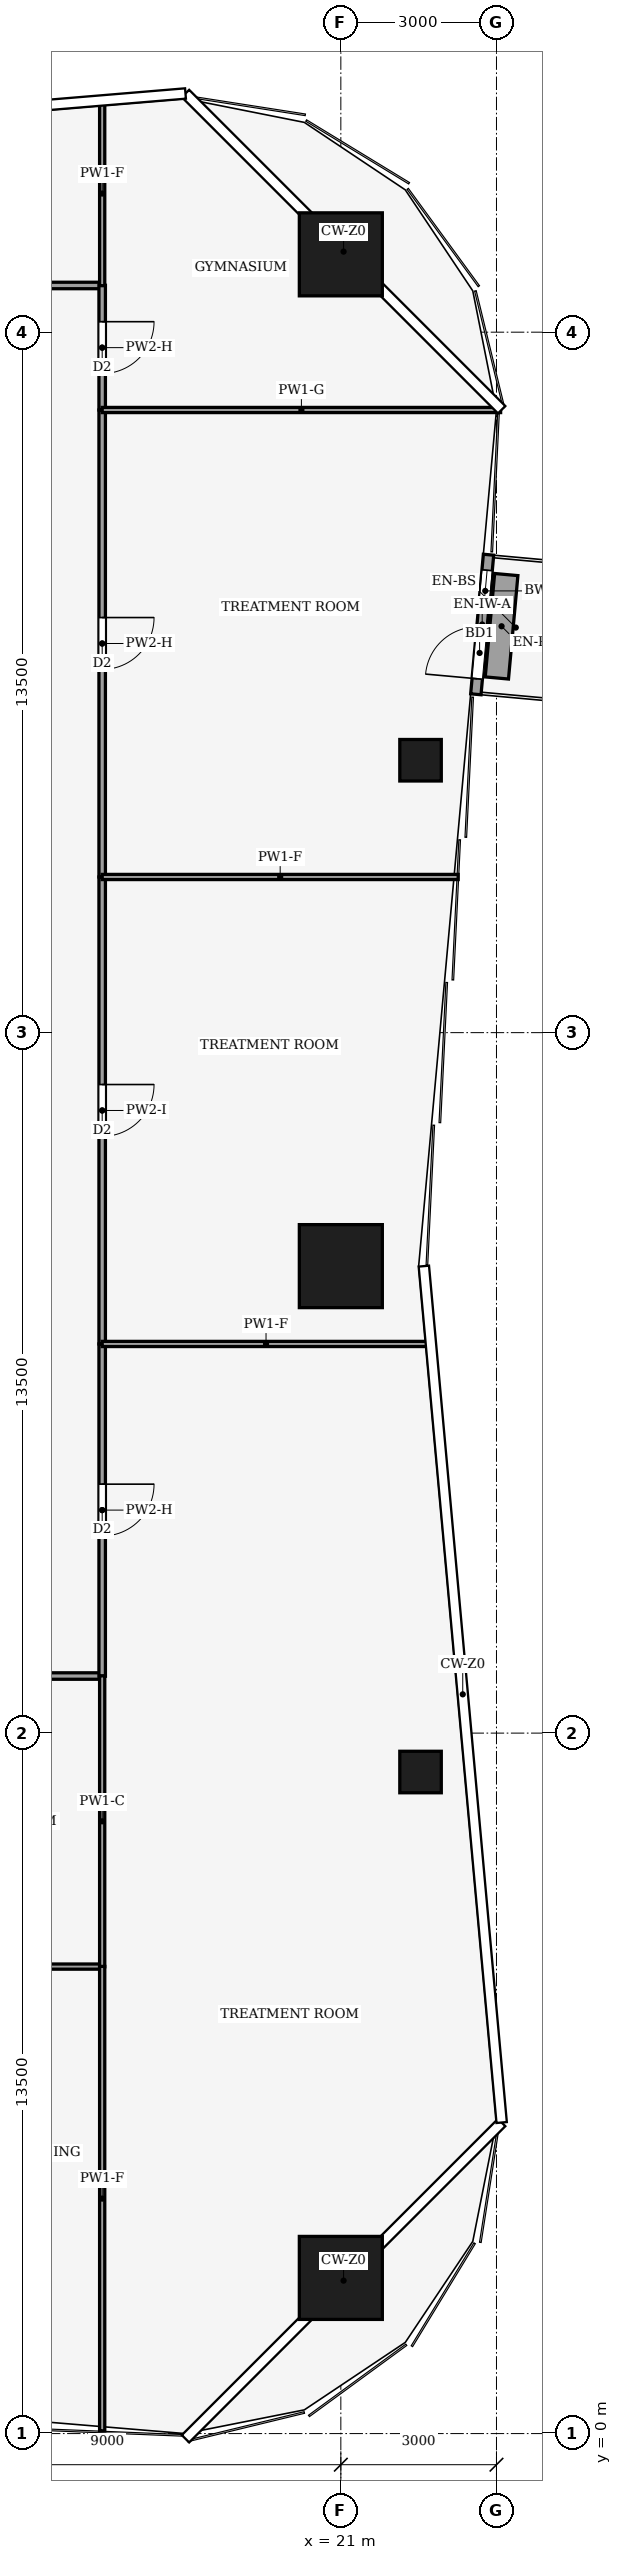
"""IFC4 building model, lengths in metres.
Left out: names, types, materials, properties, quantities, classifications, styles, units other than length and angle.
Written with IfcOpenShell. Run it as: python <this file> out.ifc"""

import sys

from ifc_helpers import new_model, si_unit, direction, frame, frame_2d, origin, origin_2d, place, context, subcontext, project, spatial, rectangle, hollow_rectangle, extrude, element, fill, save


model = new_model("IFC4")
c1 = context("Model", 3, precision=1e-05, world=origin(), true_north=direction((0.0, 1.0)))
c2 = subcontext(c1, "Body", "Model", "MODEL_VIEW")
j1 = project(units=[si_unit("LENGTHUNIT", "METRE"), si_unit("PLANEANGLEUNIT", "RADIAN")], contexts=[c1])
p1 = place(None, origin())
s1 = spatial("IfcSite", under=j1, at=p1, CompositionType="ELEMENT")
p2 = place(p1, origin())
s2 = spatial("IfcBuilding", under=s1, at=p2, CompositionType="ELEMENT")
p3 = place(p2, frame((0.0, 0.0, 18.0)))
s3 = spatial("IfcBuildingStorey", under=s2, at=p3, CompositionType="ELEMENT", Elevation=18.0)
for number, where, z_axis, x_axis in (
    (1, (21.0, 42.0, 0.0), (0.0, 0.0, 1.0), (1.0, 0.0, 0.0)),
    (2, (21.0, 22.5, 0.0), (0.0, 0.0, 1.0), (1.0, 0.0, 0.0)),
    (3, (21.0, 3.0, 0.0), (0.0, 0.0, 1.0), (1.0, 0.0, 0.0)),
):
    element("IfcColumn", number, at=place(p3, frame(where, z_axis=z_axis, x_axis=x_axis)), inside=s3, PredefinedType="COLUMN", context=c2, shape_type="SweptSolid", body=[
        extrude(hollow_rectangle(XDim=1.6, YDim=1.6, WallThickness=0.09, at=origin_2d()), origin(), (0.0, 0.0, 1.0), 4.0),
    ])
for number, where, z_axis, x_axis in (
    (4, (22.536, 12.75, 0.0), (0.0, 0.0, 1.0), (1.0, 0.0, 0.0)),
    (5, (22.536, 32.25, 0.0), (0.0, 0.0, 1.0), (1.0, 0.0, 0.0)),
):
    element("IfcColumn", number, at=place(p3, frame(where, z_axis=z_axis, x_axis=x_axis)), inside=s3, PredefinedType="COLUMN", context=c2, shape_type="SweptSolid", body=[
        extrude(hollow_rectangle(XDim=0.8, YDim=0.8, WallThickness=0.04, at=origin_2d()), origin(), (0.0, 0.0, 1.0), 4.0),
    ])
p4 = place(p3, frame((23.602, 33.521, 0.0), z_axis=(0.0, 0.0, 1.0), x_axis=(0.090552042494, 0.995891724838, 0.0)))
e6 = element("IfcWall", 6, at=p4, inside=s3, PredefinedType="SOLIDWALL", context=c2, shape_type="SweptSolid", body=[
    extrude(rectangle(XDim=2.701, YDim=0.2, at=frame_2d((1.351, 0.0))), origin(), (0.0, 0.0, 1.0), 3.65),
])
p5 = place(p4, frame((0.3, 0.0, 0.0)))
e7 = element("IfcOpeningElement", 7, at=p5, cuts=e6, PredefinedType="OPENING", context=c2, shape_type="SweptSolid", body=[
    extrude(rectangle(XDim=1.0, YDim=2.1, at=frame_2d((0.5, 1.05))), frame((0.0, 0.11, 0.0), z_axis=(0.0, -1.0, 0.0), x_axis=(1.0, 0.0, 0.0)), (0.0, 0.0, 1.0), 0.22),
])
p6 = place(p4, frame((1.601, 0.0, 0.9)))
e8 = element("IfcOpeningElement", 8, at=p6, cuts=e6, PredefinedType="OPENING", context=c2, shape_type="SweptSolid", body=[
    extrude(rectangle(XDim=0.8, YDim=1.2, at=frame_2d((0.4, 0.6))), frame((0.0, 0.11, 0.0), z_axis=(0.0, -1.0, 0.0), x_axis=(1.0, 0.0, 0.0)), (0.0, 0.0, 1.0), 0.22),
])
p7 = place(p3, frame((24.008, 33.835, 0.0), z_axis=(0.0, 0.0, 1.0), x_axis=(0.090513748512, 0.995895205998, 0.0)))
e9 = element("IfcWall", 9, at=p7, inside=s3, PredefinedType="USERDEFINED", context=c2, shape_type="SweptSolid", body=[
    extrude(rectangle(XDim=2.001, YDim=0.45, at=frame_2d((1.001, 0.0))), origin(), (0.0, 0.0, 1.0), 0.4),
])
p8 = place(p3, frame((16.4, 14.6, 0.0), z_axis=(0.0, 0.0, 1.0), x_axis=(-1.0, 0.0, 0.0)))
e10 = element("IfcWall", 10, at=p8, inside=s3, PredefinedType="PARTITIONING", context=c2, shape_type="SweptSolid", body=[
    extrude(rectangle(XDim=4.4, YDim=0.125, at=frame_2d((2.2, 0.0))), origin(), (0.0, 0.0, 1.0), 3.29),
])
p9 = place(p8, frame((1.7, 0.0, 0.0)))
e11 = element("IfcOpeningElement", 11, at=p9, cuts=e10, PredefinedType="OPENING", context=c2, shape_type="SweptSolid", body=[
    extrude(rectangle(XDim=1.0, YDim=2.1, at=frame_2d((0.5, 1.05))), frame((0.0, 0.073, 0.0), z_axis=(0.0, -1.0, 0.0), x_axis=(1.0, 0.0, 0.0)), (0.0, 0.0, 1.0), 0.145),
])
p10 = place(p3, frame((6.0, 41.4, 0.0), z_axis=(0.0, 0.0, 1.0), x_axis=(1.0, 0.0, 0.0)))
e12 = element("IfcWall", 12, at=p10, inside=s3, PredefinedType="PARTITIONING", context=c2, shape_type="SweptSolid", body=[
    extrude(rectangle(XDim=10.4, YDim=0.125, at=frame_2d((5.2, 0.0))), origin(), (0.0, 0.0, 1.0), 3.54),
])
p11 = place(p10, frame((1.9, 0.0, 0.0)))
e13 = element("IfcOpeningElement", 13, at=p11, cuts=e12, PredefinedType="OPENING", context=c2, shape_type="SweptSolid", body=[
    extrude(rectangle(XDim=1.0, YDim=2.1, at=frame_2d((0.5, 1.05))), frame((0.0, 0.073, 0.0), z_axis=(0.0, -1.0, 0.0), x_axis=(1.0, 0.0, 0.0)), (0.0, 0.0, 1.0), 0.145),
])
p12 = place(p3, frame((16.4, 21.0, 0.0), z_axis=(0.0, 0.0, 1.0), x_axis=(0.0, -1.0, 0.0)))
e14 = element("IfcWall", 14, at=p12, inside=s3, PredefinedType="PARTITIONING", context=c2, shape_type="SweptSolid", body=[
    extrude(rectangle(XDim=6.404, YDim=0.125, at=frame_2d((3.202, 0.0))), origin(), (0.0, 0.0, 1.0), 3.14),
])
p13 = place(p12, frame((2.702, 0.0, 0.0)))
e15 = element("IfcOpeningElement", 15, at=p13, cuts=e14, PredefinedType="OPENING", context=c2, shape_type="SweptSolid", body=[
    extrude(rectangle(XDim=1.0, YDim=2.1, at=frame_2d((0.5, 1.05))), frame((0.0, 0.073, 0.0), z_axis=(0.0, -1.0, 0.0), x_axis=(1.0, 0.0, 0.0)), (0.0, 0.0, 1.0), 0.145),
])
p14 = place(p3, frame((16.4, 30.0, 0.0), z_axis=(0.0, 0.0, 1.0), x_axis=(0.0, -1.0, 0.0)))
e16 = element("IfcWall", 16, at=p14, inside=s3, PredefinedType="PARTITIONING", context=c2, shape_type="SweptSolid", body=[
    extrude(rectangle(XDim=9.0, YDim=0.125, at=frame_2d((4.5, 0.0))), origin(), (0.0, 0.0, 1.0), 3.48),
])
p15 = place(p14, frame((4.0, 0.0, 0.0)))
e17 = element("IfcOpeningElement", 17, at=p15, cuts=e16, PredefinedType="OPENING", context=c2, shape_type="SweptSolid", body=[
    extrude(rectangle(XDim=1.0, YDim=2.1, at=frame_2d((0.5, 1.05))), frame((0.0, 0.073, 0.0), z_axis=(0.0, -1.0, 0.0), x_axis=(1.0, 0.0, 0.0)), (0.0, 0.0, 1.0), 0.145),
])
p16 = place(p3, frame((16.4, 39.0, 0.0), z_axis=(0.0, 0.0, 1.0), x_axis=(0.0, -1.0, 0.0)))
e18 = element("IfcWall", 18, at=p16, inside=s3, PredefinedType="PARTITIONING", context=c2, shape_type="SweptSolid", body=[
    extrude(rectangle(XDim=9.0, YDim=0.125, at=frame_2d((4.5, 0.0))), origin(), (0.0, 0.0, 1.0), 3.14),
])
p17 = place(p16, frame((4.0, 0.0, 0.0)))
e19 = element("IfcOpeningElement", 19, at=p17, cuts=e18, PredefinedType="OPENING", context=c2, shape_type="SweptSolid", body=[
    extrude(rectangle(XDim=1.0, YDim=2.1, at=frame_2d((0.5, 1.05))), frame((0.0, 0.073, 0.0), z_axis=(0.0, -1.0, 0.0), x_axis=(1.0, 0.0, 0.0)), (0.0, 0.0, 1.0), 0.145),
])
p18 = place(p3, frame((16.4, 41.404, 0.0), z_axis=(0.0, 0.0, 1.0), x_axis=(0.0, -1.0, 0.0)))
e20 = element("IfcWall", 20, at=p18, inside=s3, PredefinedType="PARTITIONING", context=c2, shape_type="SweptSolid", body=[
    extrude(rectangle(XDim=2.404, YDim=0.125, at=frame_2d((1.202, 0.0))), origin(), (0.0, 0.0, 1.0), 3.14),
])
p19 = place(p18, frame((0.702, 0.0, 0.0)))
e21 = element("IfcOpeningElement", 21, at=p19, cuts=e20, PredefinedType="OPENING", context=c2, shape_type="SweptSolid", body=[
    extrude(rectangle(XDim=1.0, YDim=2.1, at=frame_2d((0.5, 1.05))), frame((0.0, 0.073, 0.0), z_axis=(0.0, -1.0, 0.0), x_axis=(1.0, 0.0, 0.0)), (0.0, 0.0, 1.0), 0.145),
])
p20 = place(p3, frame((12.0, 9.0, 0.0), z_axis=(0.0, 0.0, 1.0), x_axis=(1.0, 0.0, 0.0)))
e22 = element("IfcWall", 22, at=p20, inside=s3, PredefinedType="PARTITIONING", context=c2, shape_type="SweptSolid", body=[
    extrude(rectangle(XDim=4.4, YDim=0.1, at=frame_2d((2.2, 0.0))), origin(), (0.0, 0.0, 1.0), 3.29),
])
p21 = place(p3, frame((16.4, 8.996, 0.0), z_axis=(0.0, 0.0, 1.0), x_axis=(0.0, 1.0, 0.0)))
e23 = element("IfcWall", 23, at=p21, inside=s3, PredefinedType="PARTITIONING", context=c2, shape_type="SweptSolid", body=[
    extrude(rectangle(XDim=5.608, YDim=0.1, at=frame_2d((2.804, 0.0))), origin(), (0.0, 0.0, 1.0), 3.87),
])
p22 = place(p3, frame((16.4, 0.053, 0.0), z_axis=(0.0, 0.0, 1.0), x_axis=(0.0, 1.0, 0.0)))
e24 = element("IfcWall", 24, at=p22, inside=s3, PredefinedType="PARTITIONING", context=c2, shape_type="SweptSolid", body=[
    extrude(rectangle(XDim=8.951, YDim=0.1, at=frame_2d((4.475, 0.0))), origin(), (0.0, 0.0, 1.0), 3.04),
])
p23 = place(p3, frame((16.4, 41.396, 0.0), z_axis=(0.0, 0.0, 1.0), x_axis=(0.0, 1.0, 0.0)))
e25 = element("IfcWall", 25, at=p23, inside=s3, PredefinedType="PARTITIONING", context=c2, shape_type="SweptSolid", body=[
    extrude(rectangle(XDim=3.551, YDim=0.1, at=frame_2d((1.775, 0.0))), origin(), (0.0, 0.0, 1.0), 3.04),
])
p24 = place(p3, frame((22.716, 21.0, 0.0), z_axis=(0.0, 0.0, 1.0), x_axis=(-1.0, 0.0, 0.0)))
e26 = element("IfcWall", 26, at=p24, inside=s3, PredefinedType="PARTITIONING", context=c2, shape_type="SweptSolid", body=[
    extrude(rectangle(XDim=6.316, YDim=0.1, at=frame_2d((3.158, 0.0))), origin(), (0.0, 0.0, 1.0), 3.04),
])
p25 = place(p3, frame((23.262, 30.0, 0.0), z_axis=(0.0, 0.0, 1.0), x_axis=(-1.0, 0.0, 0.0)))
e27 = element("IfcWall", 27, at=p25, inside=s3, PredefinedType="PARTITIONING", context=c2, shape_type="SweptSolid", body=[
    extrude(rectangle(XDim=6.862, YDim=0.1, at=frame_2d((3.431, 0.0))), origin(), (0.0, 0.0, 1.0), 3.04),
])
p26 = place(p3, frame((24.08, 39.0, 0.0), z_axis=(0.0, 0.0, 1.0), x_axis=(-1.0, 0.0, 0.0)))
e28 = element("IfcWall", 28, at=p26, inside=s3, PredefinedType="PARTITIONING", context=c2, shape_type="SweptSolid", body=[
    extrude(rectangle(XDim=7.68, YDim=0.1, at=frame_2d((3.84, 0.0))), origin(), (0.0, 0.0, 1.0), 2.93),
])
p27 = place(p5, origin())
e29 = element("IfcDoor", 29, at=p27, inside=s3, OperationType="SINGLE_SWING_LEFT", PredefinedType="DOOR", context=c2, shape_type="SweptSolid", body=[
    extrude(rectangle(XDim=1.0, YDim=2.1, at=frame_2d((0.5, 1.05))), frame((0.0, 0.025, 0.0), z_axis=(0.0, -1.0, 0.0), x_axis=(1.0, 0.0, 0.0)), (0.0, 0.0, 1.0), 0.05),
])
fill(e7, e29)
p28 = place(p6, origin())
e30 = element("IfcWindow", 30, at=p28, inside=s3, PartitioningType="SINGLE_PANEL", PredefinedType="WINDOW", context=c2, shape_type="SweptSolid", body=[
    extrude(rectangle(XDim=0.8, YDim=1.2, at=frame_2d((0.4, 0.6))), frame((0.0, 0.03, 0.0), z_axis=(0.0, -1.0, 0.0), x_axis=(1.0, 0.0, 0.0)), (0.0, 0.0, 1.0), 0.06),
])
fill(e8, e30)
p29 = place(p13, origin())
e31 = element("IfcDoor", 31, at=p29, inside=s3, OperationType="SINGLE_SWING_LEFT", PredefinedType="DOOR", context=c2, shape_type="SweptSolid", body=[
    extrude(rectangle(XDim=1.0, YDim=2.1, at=frame_2d((0.5, 1.05))), frame((0.0, 0.025, 0.0), z_axis=(0.0, -1.0, 0.0), x_axis=(1.0, 0.0, 0.0)), (0.0, 0.0, 1.0), 0.05),
])
fill(e15, e31)
p30 = place(p15, origin())
e32 = element("IfcDoor", 32, at=p30, inside=s3, OperationType="SINGLE_SWING_RIGHT", PredefinedType="DOOR", context=c2, shape_type="SweptSolid", body=[
    extrude(rectangle(XDim=1.0, YDim=2.1, at=frame_2d((0.5, 1.05))), frame((0.0, 0.025, 0.0), z_axis=(0.0, -1.0, 0.0), x_axis=(1.0, 0.0, 0.0)), (0.0, 0.0, 1.0), 0.05),
])
fill(e17, e32)
p31 = place(p17, origin())
e33 = element("IfcDoor", 33, at=p31, inside=s3, OperationType="SINGLE_SWING_LEFT", PredefinedType="DOOR", context=c2, shape_type="SweptSolid", body=[
    extrude(rectangle(XDim=1.0, YDim=2.1, at=frame_2d((0.5, 1.05))), frame((0.0, 0.025, 0.0), z_axis=(0.0, -1.0, 0.0), x_axis=(1.0, 0.0, 0.0)), (0.0, 0.0, 1.0), 0.05),
])
fill(e19, e33)
p32 = place(p19, origin())
e34 = element("IfcDoor", 34, at=p32, inside=s3, OperationType="SINGLE_SWING_RIGHT", PredefinedType="DOOR", context=c2, shape_type="SweptSolid", body=[
    extrude(rectangle(XDim=1.0, YDim=2.1, at=frame_2d((0.5, 1.05))), frame((0.0, 0.025, 0.0), z_axis=(0.0, -1.0, 0.0), x_axis=(1.0, 0.0, 0.0)), (0.0, 0.0, 1.0), 0.05),
])
fill(e21, e34)
save(model, sys.argv[1])
